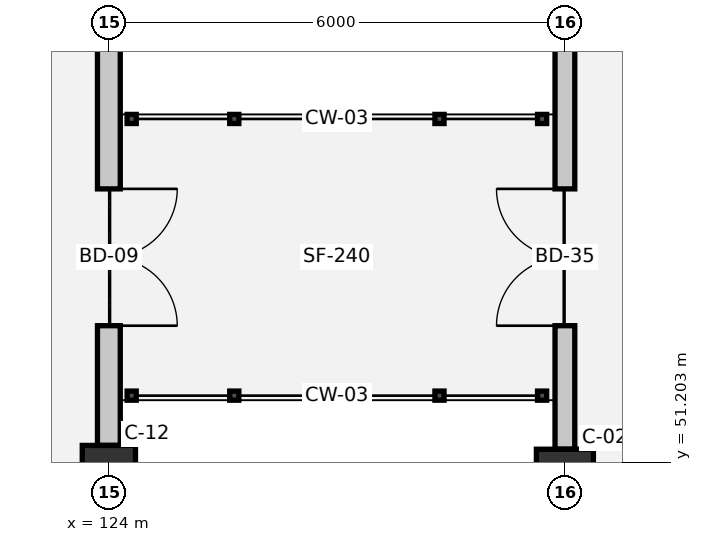
"""IFC4 building model, lengths in metres.
Left out: names, types, materials, properties, quantities, classifications, styles, units other than length and angle.
Written with IfcOpenShell. Run it as: python <this file> out.ifc"""

import sys

from ifc_helpers import new_model, si_unit, direction, frame, frame_2d, origin, origin_2d, place, context, subcontext, project, spatial, rectangle, extrude, element, fill, save


model = new_model("IFC4")
c1 = context("Model", 3, precision=1e-05, world=origin(), true_north=direction((0.0, 1.0)))
c2 = subcontext(c1, "Body", "Model", "MODEL_VIEW")
j1 = project(units=[si_unit("LENGTHUNIT", "METRE"), si_unit("PLANEANGLEUNIT", "RADIAN")], contexts=[c1])
p1 = place(None, origin())
s1 = spatial("IfcSite", under=j1, at=p1, CompositionType="ELEMENT")
p2 = place(p1, origin())
s2 = spatial("IfcBuilding", under=s1, at=p2, CompositionType="ELEMENT")
p3 = place(p2, frame((0.0, 0.0, 5.4)))
s3 = spatial("IfcBuildingStorey", under=s2, at=p3, CompositionType="ELEMENT", Elevation=5.4)
p4 = place(p3, frame((124.0, 51.0, 0.0), z_axis=(0.0, 0.0, 1.0), x_axis=(1.0, 0.0, 0.0)))
e1 = element("IfcColumn", 1, at=p4, inside=s3, PredefinedType="COLUMN", context=c2, shape_type="SweptSolid", body=[
    extrude(rectangle(XDim=0.7, YDim=0.85, at=origin_2d()), origin(), (0.0, 0.0, 1.0), 4.5),
])
p5 = place(p3, frame((130.0, 51.0, 0.0), z_axis=(0.0, 0.0, 1.0), x_axis=(1.0, 0.0, 0.0)))
e2 = element("IfcColumn", 2, at=p5, inside=s3, PredefinedType="COLUMN", context=c2, shape_type="SweptSolid", body=[
    extrude(rectangle(XDim=0.75, YDim=0.75, at=origin_2d()), origin(), (0.0, 0.0, 1.0), 4.5),
])
p6 = place(p3, frame((124.0, 64.575, 0.0), z_axis=(0.0, 0.0, 1.0), x_axis=(0.0, -1.0, 0.0)))
e3 = element("IfcWall", 3, at=p6, inside=s3, PredefinedType="SOLIDWALL", context=c2, shape_type="SweptSolid", body=[
    extrude(rectangle(XDim=13.15, YDim=0.3, at=frame_2d((6.575, 0.0))), origin(), (0.0, 0.0, 1.0), 3.23),
])
p7 = place(p6, frame((9.775, 0.0, 0.0)))
e4 = element("IfcOpeningElement", 4, at=p7, cuts=e3, PredefinedType="OPENING", context=c2, shape_type="SweptSolid", body=[
    extrude(rectangle(XDim=1.8, YDim=2.25, at=frame_2d((0.9, 1.125))), frame((0.0, 0.16, 0.0), z_axis=(0.0, -1.0, 0.0), x_axis=(1.0, 0.0, 0.0)), (0.0, 0.0, 1.0), 0.32),
])
p8 = place(p3, frame((130.0, 51.375, 0.0), z_axis=(0.0, 0.0, 1.0), x_axis=(0.0, 1.0, 0.0)))
e5 = element("IfcWall", 5, at=p8, inside=s3, PredefinedType="SOLIDWALL", context=c2, shape_type="SweptSolid", body=[
    extrude(rectangle(XDim=13.25, YDim=0.26, at=frame_2d((6.625, 0.0))), origin(), (0.0, 0.0, 1.0), 3.23),
])
p9 = place(p8, frame((1.625, 0.0, 0.0)))
e6 = element("IfcOpeningElement", 6, at=p9, cuts=e5, PredefinedType="OPENING", context=c2, shape_type="SweptSolid", body=[
    extrude(rectangle(XDim=1.8, YDim=2.25, at=frame_2d((0.9, 1.125))), frame((0.0, 0.14, 0.0), z_axis=(0.0, -1.0, 0.0), x_axis=(1.0, 0.0, 0.0)), (0.0, 0.0, 1.0), 0.28),
])
p10 = place(p7, origin())
e7 = element("IfcDoor", 7, at=p10, inside=s3, OperationType="DOUBLE_DOOR_SINGLE_SWING", PredefinedType="DOOR", context=c2, shape_type="SweptSolid", body=[
    extrude(rectangle(XDim=1.8, YDim=2.25, at=frame_2d((0.9, 1.125))), frame((0.0, 0.025, 0.0), z_axis=(0.0, -1.0, 0.0), x_axis=(1.0, 0.0, 0.0)), (0.0, 0.0, 1.0), 0.05),
])
fill(e4, e7)
p11 = place(p9, origin())
e8 = element("IfcDoor", 8, at=p11, inside=s3, OperationType="DOUBLE_DOOR_SINGLE_SWING", PredefinedType="DOOR", context=c2, shape_type="SweptSolid", body=[
    extrude(rectangle(XDim=1.8, YDim=2.25, at=frame_2d((0.9, 1.125))), frame((0.0, 0.025, 0.0), z_axis=(0.0, -1.0, 0.0), x_axis=(1.0, 0.0, 0.0)), (0.0, 0.0, 1.0), 0.05),
])
fill(e6, e8)
save(model, sys.argv[1])
